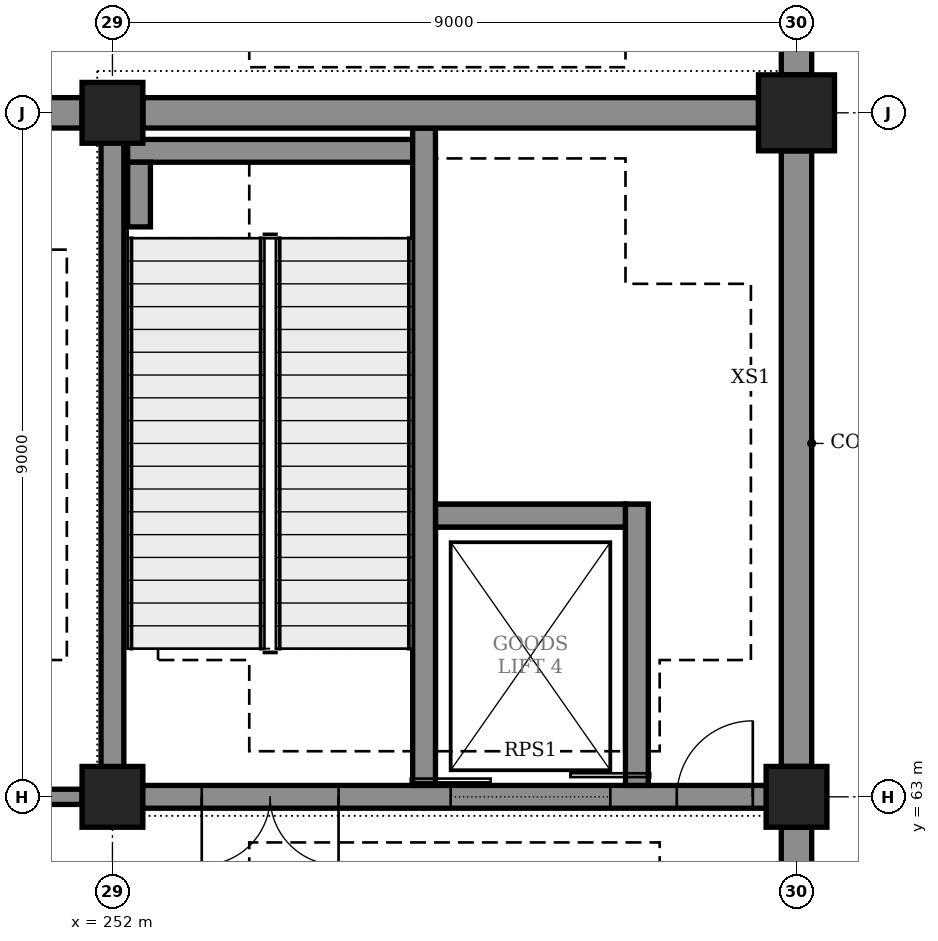
"""IFC4 building model, lengths in metres.
Left out: names, types, materials, properties, quantities, classifications, styles, units other than length and angle.
Written with IfcOpenShell. Run it as: python <this file> out.ifc"""

import sys

from ifc_helpers import new_model, si_unit, direction, frame, frame_2d, origin, origin_2d, place, context, subcontext, project, spatial, rectangle, hollow_rectangle, extrude, element, fill, save


model = new_model("IFC4")
c1 = context("Model", 3, precision=1e-05, world=origin(), true_north=direction((0.0, 1.0)))
c2 = subcontext(c1, "Body", "Model", "MODEL_VIEW")
j1 = project(units=[si_unit("LENGTHUNIT", "METRE"), si_unit("PLANEANGLEUNIT", "RADIAN")], contexts=[c1])
p1 = place(None, origin())
s1 = spatial("IfcSite", under=j1, at=p1, CompositionType="ELEMENT")
p2 = place(p1, origin())
s2 = spatial("IfcBuilding", under=s1, at=p2, CompositionType="ELEMENT")
p3 = place(p2, origin())
s3 = spatial("IfcBuildingStorey", under=s2, at=p3, CompositionType="ELEMENT", Elevation=0.0)
p4 = place(p3, frame((261.0, 72.0, 0.0), z_axis=(0.0, 0.0, 1.0), x_axis=(1.0, 0.0, 0.0)))
e1 = element("IfcColumn", 1, at=p4, inside=s3, PredefinedType="COLUMN", context=c2, shape_type="SweptSolid", body=[
    extrude(hollow_rectangle(XDim=1.0, YDim=1.0, WallThickness=0.032, at=origin_2d()), origin(), (0.0, 0.0, 1.0), 6.0),
])
for number, where, z_axis, x_axis in (
    (2, (252.0, 63.0, 0.0), (0.0, 0.0, 1.0), (1.0, 0.0, 0.0)),
    (3, (261.0, 63.0, 0.0), (0.0, 0.0, 1.0), (1.0, 0.0, 0.0)),
    (4, (252.0, 72.0, 0.0), (0.0, 0.0, 1.0), (1.0, 0.0, 0.0)),
):
    element("IfcColumn", number, at=place(p3, frame(where, z_axis=z_axis, x_axis=x_axis)), inside=s3, PredefinedType="COLUMN", context=c2, shape_type="SweptSolid", body=[
        extrude(rectangle(XDim=0.8, YDim=0.8, at=origin_2d()), origin(), (0.0, 0.0, 1.0), 6.0),
    ])
p5 = place(p3, frame((251.85, 63.0, 0.0), z_axis=(0.0, 0.0, 1.0), x_axis=(1.0, 0.0, 0.0)))
e5 = element("IfcWall", 5, at=p5, inside=s3, PredefinedType="SHEAR", context=c2, shape_type="SweptSolid", body=[
    extrude(rectangle(XDim=8.95, YDim=0.3, at=frame_2d((4.475, 0.0))), origin(), (0.0, 0.0, 1.0), 6.0),
])
p6 = place(p5, frame((1.325, 0.0, 0.0)))
e6 = element("IfcOpeningElement", 6, at=p6, cuts=e5, PredefinedType="OPENING", context=c2, shape_type="SweptSolid", body=[
    extrude(rectangle(XDim=1.8, YDim=2.4, at=frame_2d((0.9, 1.2))), frame((0.0, 0.16, 0.0), z_axis=(0.0, -1.0, 0.0), x_axis=(1.0, 0.0, 0.0)), (0.0, 0.0, 1.0), 0.32),
])
p7 = place(p5, frame((4.6, 0.0, 0.0)))
e7 = element("IfcOpeningElement", 7, at=p7, cuts=e5, PredefinedType="OPENING", context=c2, shape_type="SweptSolid", body=[
    extrude(rectangle(XDim=2.1, YDim=2.4, at=frame_2d((1.05, 1.2))), frame((0.0, 0.16, 0.0), z_axis=(0.0, -1.0, 0.0), x_axis=(1.0, 0.0, 0.0)), (0.0, 0.0, 1.0), 0.32),
])
p8 = place(p5, frame((7.575, 0.0, 0.0)))
e8 = element("IfcOpeningElement", 8, at=p8, cuts=e5, PredefinedType="OPENING", context=c2, shape_type="SweptSolid", body=[
    extrude(rectangle(XDim=1.0, YDim=2.4, at=frame_2d((0.5, 1.2))), frame((0.0, 0.16, 0.0), z_axis=(0.0, -1.0, 0.0), x_axis=(1.0, 0.0, 0.0)), (0.0, 0.0, 1.0), 0.32),
])
p9 = place(p3, frame((252.0, 63.15, 0.0), z_axis=(0.0, 0.0, 1.0), x_axis=(0.0, 1.0, 0.0)))
e9 = element("IfcWall", 9, at=p9, inside=s3, PredefinedType="SHEAR", context=c2, shape_type="SweptSolid", body=[
    extrude(rectangle(XDim=8.65, YDim=0.3, at=frame_2d((4.325, 0.0))), origin(), (0.0, 0.0, 1.0), 6.0),
])
p10 = place(p3, frame((261.0, 54.5, 0.0), z_axis=(0.0, 0.0, 1.0), x_axis=(0.0, 1.0, 0.0)))
e10 = element("IfcWall", 10, at=p10, inside=s3, PredefinedType="SOLIDWALL", context=c2, shape_type="SweptSolid", body=[
    extrude(rectangle(XDim=8.1, YDim=0.4, at=frame_2d((4.05, 0.0))), origin(), (0.0, 0.0, 1.0), 4.92),
])
p11 = place(p10, frame((0.95, 0.0, 0.0)))
e11 = element("IfcOpeningElement", 11, at=p11, cuts=e10, PredefinedType="OPENING", context=c2, shape_type="SweptSolid", body=[
    extrude(rectangle(XDim=2.1, YDim=2.4, at=frame_2d((1.05, 1.2))), frame((0.0, 0.21, 0.0), z_axis=(0.0, -1.0, 0.0), x_axis=(1.0, 0.0, 0.0)), (0.0, 0.0, 1.0), 0.42),
])
p12 = place(p10, frame((4.95, 0.0, 0.0)))
e12 = element("IfcOpeningElement", 12, at=p12, cuts=e10, PredefinedType="OPENING", context=c2, shape_type="SweptSolid", body=[
    extrude(rectangle(XDim=2.1, YDim=2.4, at=frame_2d((1.05, 1.2))), frame((0.0, 0.21, 0.0), z_axis=(0.0, -1.0, 0.0), x_axis=(1.0, 0.0, 0.0)), (0.0, 0.0, 1.0), 0.42),
])
p13 = place(p3, frame((261.0, 63.4, 0.0), z_axis=(0.0, 0.0, 1.0), x_axis=(0.0, 1.0, 0.0)))
e13 = element("IfcWall", 13, at=p13, inside=s3, PredefinedType="SOLIDWALL", context=c2, shape_type="SweptSolid", body=[
    extrude(rectangle(XDim=8.1, YDim=0.4, at=frame_2d((4.05, 0.0))), origin(), (0.0, 0.0, 1.0), 4.92),
])
p14 = place(p3, frame((261.0, 72.5, 0.0), z_axis=(0.0, 0.0, 1.0), x_axis=(0.0, 1.0, 0.0)))
e14 = element("IfcWall", 14, at=p14, inside=s3, PredefinedType="SOLIDWALL", context=c2, shape_type="SweptSolid", body=[
    extrude(rectangle(XDim=17.0, YDim=0.4, at=frame_2d((8.5, 0.0))), origin(), (0.0, 0.0, 1.0), 6.0),
])
p15 = place(p14, frame((3.15, 0.0, 0.0)))
e15 = element("IfcOpeningElement", 15, at=p15, cuts=e14, PredefinedType="OPENING", context=c2, shape_type="SweptSolid", body=[
    extrude(rectangle(XDim=2.7, YDim=2.4, at=frame_2d((1.35, 1.2))), frame((0.0, 0.21, 0.0), z_axis=(0.0, -1.0, 0.0), x_axis=(1.0, 0.0, 0.0)), (0.0, 0.0, 1.0), 0.42),
])
p16 = place(p14, frame((11.15, 0.0, 0.0)))
e16 = element("IfcOpeningElement", 16, at=p16, cuts=e14, PredefinedType="OPENING", context=c2, shape_type="SweptSolid", body=[
    extrude(rectangle(XDim=2.7, YDim=2.4, at=frame_2d((1.35, 1.2))), frame((0.0, 0.21, 0.0), z_axis=(0.0, -1.0, 0.0), x_axis=(1.0, 0.0, 0.0)), (0.0, 0.0, 1.0), 0.42),
])
p17 = place(p3, frame((243.0, 72.0, 0.0), z_axis=(0.0, 0.0, 1.0), x_axis=(1.0, 0.0, 0.0)))
e17 = element("IfcWall", 17, at=p17, inside=s3, PredefinedType="SOLIDWALL", context=c2, shape_type="SweptSolid", body=[
    extrude(rectangle(XDim=8.6, YDim=0.4, at=frame_2d((4.3, 0.0))), origin(), (0.0, 0.0, 1.0), 4.82),
])
p18 = place(p3, frame((252.4, 72.0, 0.0), z_axis=(0.0, 0.0, 1.0), x_axis=(1.0, 0.0, 0.0)))
e18 = element("IfcWall", 18, at=p18, inside=s3, PredefinedType="SOLIDWALL", context=c2, shape_type="SweptSolid", body=[
    extrude(rectangle(XDim=8.1, YDim=0.4, at=frame_2d((4.05, 0.0))), origin(), (0.0, 0.0, 1.0), 4.82),
])
p19 = place(p3, frame((252.2, 71.5, 0.0), z_axis=(0.0, 0.0, 1.0), x_axis=(1.0, 0.0, 0.0)))
e19 = element("IfcWall", 19, at=p19, inside=s3, PredefinedType="SHEAR", context=c2, shape_type="SweptSolid", body=[
    extrude(rectangle(XDim=3.75, YDim=0.3, at=frame_2d((1.875, 0.0))), origin(), (0.0, 0.0, 1.0), 2.8),
])
p20 = place(p3, frame((252.35, 70.499, 0.0), z_axis=(0.0, 0.0, 1.0), x_axis=(0.0, 1.0, 0.0)))
e20 = element("IfcWall", 20, at=p20, inside=s3, PredefinedType="SHEAR", context=c2, shape_type="SweptSolid", body=[
    extrude(rectangle(XDim=0.851, YDim=0.3, at=frame_2d((0.425, 0.0))), origin(), (0.0, 0.0, 1.0), 2.8),
])
p21 = place(p3, frame((256.1, 63.15, 0.0), z_axis=(0.0, 0.0, 1.0), x_axis=(0.0, 1.0, 0.0)))
e21 = element("IfcWall", 21, at=p21, inside=s3, PredefinedType="SHEAR", context=c2, shape_type="SweptSolid", body=[
    extrude(rectangle(XDim=8.65, YDim=0.3, at=frame_2d((4.325, 0.0))), origin(), (0.0, 0.0, 1.0), 5.72),
])
p22 = place(p3, frame((258.9, 63.15, 0.0), z_axis=(0.0, 0.0, 1.0), x_axis=(0.0, 1.0, 0.0)))
e22 = element("IfcWall", 22, at=p22, inside=s3, PredefinedType="SHEAR", context=c2, shape_type="SweptSolid", body=[
    extrude(rectangle(XDim=3.7, YDim=0.3, at=frame_2d((1.85, 0.0))), origin(), (0.0, 0.0, 1.0), 5.72),
])
p23 = place(p3, frame((256.25, 66.7, 0.0), z_axis=(0.0, 0.0, 1.0), x_axis=(1.0, 0.0, 0.0)))
e23 = element("IfcWall", 23, at=p23, inside=s3, PredefinedType="SHEAR", context=c2, shape_type="SweptSolid", body=[
    extrude(rectangle(XDim=2.5, YDim=0.3, at=frame_2d((1.25, 0.0))), origin(), (0.0, 0.0, 1.0), 5.72),
])
for number, where, z_axis, x_axis in (
    (24, (256.1, 63.6, -1.4), (0.0, 0.0, 1.0), (0.0, 1.0, 0.0)),
    (25, (258.9, 63.6, -1.4), (0.0, 0.0, 1.0), (0.0, 1.0, 0.0)),
):
    element("IfcWall", number, at=place(p3, frame(where, z_axis=z_axis, x_axis=x_axis)), inside=s3, PredefinedType="SHEAR", context=c2, shape_type="SweptSolid", body=[
        extrude(rectangle(XDim=3.25, YDim=0.3, at=frame_2d((1.625, 0.0))), origin(), (0.0, 0.0, 1.0), 1.4),
    ])
p24 = place(p3, frame((256.25, 66.7, -1.4), z_axis=(0.0, 0.0, 1.0), x_axis=(1.0, 0.0, 0.0)))
e26 = element("IfcWall", 26, at=p24, inside=s3, PredefinedType="SHEAR", context=c2, shape_type="SweptSolid", body=[
    extrude(rectangle(XDim=2.5, YDim=0.3, at=frame_2d((1.25, 0.0))), origin(), (0.0, 0.0, 1.0), 1.4),
])
p25 = place(p3, frame((243.15, 63.0, 0.0), z_axis=(0.0, 0.0, 1.0), x_axis=(1.0, 0.0, 0.0)))
e27 = element("IfcWall", 27, at=p25, inside=s3, PredefinedType="PARTITIONING", context=c2, shape_type="SweptSolid", body=[
    extrude(rectangle(XDim=8.45, YDim=0.2, at=frame_2d((4.225, 0.0))), origin(), (0.0, 0.0, 1.0), 4.82),
])
p26 = place(p25, frame((3.725, 0.0, 0.015)))
e28 = element("IfcOpeningElement", 28, at=p26, cuts=e27, PredefinedType="OPENING", context=c2, shape_type="SweptSolid", body=[
    extrude(rectangle(XDim=1.0, YDim=2.4, at=frame_2d((0.5, 1.2))), frame((0.0, 0.11, 0.0), z_axis=(0.0, -1.0, 0.0), x_axis=(1.0, 0.0, 0.0)), (0.0, 0.0, 1.0), 0.22),
])
p27 = place(p6, frame((1.8, 0.0, 0.0), z_axis=(0.0, 0.0, 1.0), x_axis=(-1.0, 0.0, 0.0)))
e29 = element("IfcDoor", 29, at=p27, inside=s3, OperationType="DOUBLE_DOOR_SINGLE_SWING", PredefinedType="DOOR", context=c2, shape_type="SweptSolid", body=[
    extrude(rectangle(XDim=1.8, YDim=2.4, at=frame_2d((0.9, 1.2))), frame((0.0, 0.025, 0.0), z_axis=(0.0, -1.0, 0.0), x_axis=(1.0, 0.0, 0.0)), (0.0, 0.0, 1.0), 0.05),
])
fill(e6, e29)
p28 = place(p7, origin())
e30 = element("IfcDoor", 30, at=p28, inside=s3, OperationType="DOUBLE_DOOR_SLIDING", PredefinedType="DOOR", context=c2, shape_type="SweptSolid", body=[
    extrude(rectangle(XDim=2.1, YDim=2.4, at=frame_2d((1.05, 1.2))), frame((0.0, 0.025, 0.0), z_axis=(0.0, -1.0, 0.0), x_axis=(1.0, 0.0, 0.0)), (0.0, 0.0, 1.0), 0.05),
])
fill(e7, e30)
p29 = place(p8, origin())
e31 = element("IfcDoor", 31, at=p29, inside=s3, OperationType="SINGLE_SWING_RIGHT", PredefinedType="DOOR", context=c2, shape_type="SweptSolid", body=[
    extrude(rectangle(XDim=1.0, YDim=2.4, at=frame_2d((0.5, 1.2))), frame((0.0, 0.025, 0.0), z_axis=(0.0, -1.0, 0.0), x_axis=(1.0, 0.0, 0.0)), (0.0, 0.0, 1.0), 0.05),
])
fill(e8, e31)
save(model, sys.argv[1])
